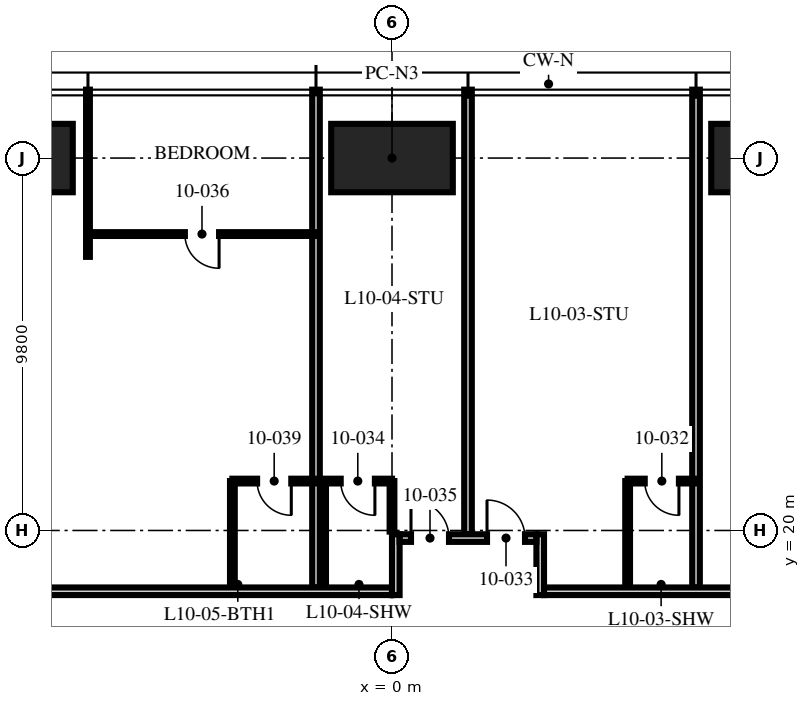
"""IFC4 building model, lengths in metres.
Left out: names, types, materials, properties, quantities, classifications, styles, units other than length and angle.
Written with IfcOpenShell. Run it as: python <this file> out.ifc"""

import sys

from ifc_helpers import new_model, si_unit, direction, frame, frame_2d, origin, origin_2d, place, context, subcontext, project, spatial, rectangle, hollow_rectangle, extrude, element, fill, save


model = new_model("IFC4")
c1 = context("Model", 3, precision=1e-05, world=origin(), true_north=direction((0.0, 1.0)))
c2 = subcontext(c1, "Body", "Model", "MODEL_VIEW")
j1 = project(units=[si_unit("LENGTHUNIT", "METRE"), si_unit("PLANEANGLEUNIT", "RADIAN")], contexts=[c1])
p1 = place(None, origin())
s1 = spatial("IfcSite", under=j1, at=p1, CompositionType="ELEMENT")
p2 = place(p1, origin())
s2 = spatial("IfcBuilding", under=s1, at=p2, CompositionType="ELEMENT")
p3 = place(p2, frame((0.0, 0.0, 43.5)))
s3 = spatial("IfcBuildingStorey", under=s2, at=p3, CompositionType="ELEMENT", Elevation=43.5)
for number, where, z_axis, x_axis in (
    (1, (-10.0, 29.8, 0.0), (0.0, 0.0, 1.0), (1.0, 0.0, 0.0)),
    (2, (0.0, 29.8, 0.0), (0.0, 0.0, 1.0), (1.0, 0.0, 0.0)),
    (3, (10.0, 29.8, 0.0), (0.0, 0.0, 1.0), (1.0, 0.0, 0.0)),
):
    element("IfcColumn", number, at=place(p3, frame(where, z_axis=z_axis, x_axis=x_axis)), inside=s3, PredefinedType="COLUMN", context=c2, shape_type="SweptSolid", body=[
        extrude(hollow_rectangle(XDim=3.2, YDim=1.8, WallThickness=0.2, at=origin_2d()), origin(), (0.0, 0.0, 1.0), 3.75),
    ])
p4 = place(p3, frame((8.0, 18.5, 0.0), z_axis=(0.0, 0.0, 1.0), x_axis=(0.0, 1.0, 0.0)))
e4 = element("IfcWall", 4, at=p4, inside=s3, PredefinedType="PARTITIONING", context=c2, shape_type="SweptSolid", body=[
    extrude(rectangle(XDim=13.1, YDim=0.2, at=frame_2d((6.55, 0.0))), origin(), (0.0, 0.0, 1.0), 2.71),
])
p5 = place(p3, frame((2.0, 19.9, 0.0), z_axis=(0.0, 0.0, 1.0), x_axis=(0.0, 1.0, 0.0)))
e5 = element("IfcWall", 5, at=p5, inside=s3, PredefinedType="PARTITIONING", context=c2, shape_type="SweptSolid", body=[
    extrude(rectangle(XDim=11.7, YDim=0.2, at=frame_2d((5.85, 0.0))), origin(), (0.0, 0.0, 1.0), 2.71),
])
p6 = place(p3, frame((-2.0, 18.5, 0.0), z_axis=(0.0, 0.0, 1.0), x_axis=(0.0, 1.0, 0.0)))
e6 = element("IfcWall", 6, at=p6, inside=s3, PredefinedType="PARTITIONING", context=c2, shape_type="SweptSolid", body=[
    extrude(rectangle(XDim=13.1, YDim=0.2, at=frame_2d((6.55, 0.0))), origin(), (0.0, 0.0, 1.0), 2.71),
])
p7 = place(p3, frame((-8.0, 27.2, 0.0), z_axis=(0.0, 0.0, 1.0), x_axis=(0.0, 1.0, 0.0)))
e7 = element("IfcWall", 7, at=p7, inside=s3, PredefinedType="PARTITIONING", context=c2, shape_type="SweptSolid", body=[
    extrude(rectangle(XDim=4.4, YDim=0.1, at=frame_2d((2.2, 0.0))), origin(), (0.0, 0.0, 1.0), 2.71),
])
p8 = place(p3, frame((8.0, 21.3, 0.0), z_axis=(0.0, 0.0, 1.0), x_axis=(-1.0, 0.0, 0.0)))
e8 = element("IfcWall", 8, at=p8, inside=s3, PredefinedType="PARTITIONING", context=c2, shape_type="SweptSolid", body=[
    extrude(rectangle(XDim=1.8, YDim=0.125, at=frame_2d((0.9, 0.0))), origin(), (0.0, 0.0, 1.0), 3.5),
])
p9 = place(p8, frame((0.45, 0.0, 0.0)))
e9 = element("IfcOpeningElement", 9, at=p9, cuts=e8, PredefinedType="OPENING", context=c2, shape_type="SweptSolid", body=[
    extrude(rectangle(XDim=0.9, YDim=2.1, at=frame_2d((0.45, 1.05))), frame((0.0, 0.073, 0.0), z_axis=(0.0, -1.0, 0.0), x_axis=(1.0, 0.0, 0.0)), (0.0, 0.0, 1.0), 0.145),
])
p10 = place(p3, frame((6.2, 18.5, 0.0), z_axis=(0.0, 0.0, 1.0), x_axis=(0.0, 1.0, 0.0)))
e10 = element("IfcWall", 10, at=p10, inside=s3, PredefinedType="PARTITIONING", context=c2, shape_type="SweptSolid", body=[
    extrude(rectangle(XDim=2.8, YDim=0.125, at=frame_2d((1.4, 0.0))), origin(), (0.0, 0.0, 1.0), 3.5),
])
p11 = place(p3, frame((0.0, 21.3, 0.0), z_axis=(0.0, 0.0, 1.0), x_axis=(-1.0, 0.0, 0.0)))
e11 = element("IfcWall", 11, at=p11, inside=s3, PredefinedType="PARTITIONING", context=c2, shape_type="SweptSolid", body=[
    extrude(rectangle(XDim=1.8, YDim=0.125, at=frame_2d((0.9, 0.0))), origin(), (0.0, 0.0, 1.0), 2.492),
])
p12 = place(p11, frame((0.45, 0.0, 0.0)))
e12 = element("IfcOpeningElement", 12, at=p12, cuts=e11, PredefinedType="OPENING", context=c2, shape_type="SweptSolid", body=[
    extrude(rectangle(XDim=0.9, YDim=2.1, at=frame_2d((0.45, 1.05))), frame((0.0, 0.073, 0.0), z_axis=(0.0, -1.0, 0.0), x_axis=(1.0, 0.0, 0.0)), (0.0, 0.0, 1.0), 0.145),
])
p13 = place(p3, frame((0.0, 19.97, 0.0), z_axis=(0.0, 0.0, 1.0), x_axis=(0.0, 1.0, 0.0)))
e13 = element("IfcWall", 13, at=p13, inside=s3, PredefinedType="PARTITIONING", context=c2, shape_type="SweptSolid", body=[
    extrude(rectangle(XDim=1.33, YDim=0.125, at=frame_2d((0.665, 0.0))), origin(), (0.0, 0.0, 1.0), 2.492),
])
p14 = place(p3, frame((-1.8, 18.5, 0.0), z_axis=(0.0, 0.0, 1.0), x_axis=(0.0, 1.0, 0.0)))
e14 = element("IfcWall", 14, at=p14, inside=s3, PredefinedType="PARTITIONING", context=c2, shape_type="SweptSolid", body=[
    extrude(rectangle(XDim=2.8, YDim=0.125, at=frame_2d((1.4, 0.0))), origin(), (0.0, 0.0, 1.0), 3.5),
])
p15 = place(p3, frame((-2.0, 27.8, 0.0), z_axis=(0.0, 0.0, 1.0), x_axis=(-1.0, 0.0, 0.0)))
e15 = element("IfcWall", 15, at=p15, inside=s3, PredefinedType="PARTITIONING", context=c2, shape_type="SweptSolid", body=[
    extrude(rectangle(XDim=6.0, YDim=0.1, at=frame_2d((3.0, 0.0))), origin(), (0.0, 0.0, 1.0), 2.61),
])
p16 = place(p15, frame((2.55, 0.0, 0.0)))
e16 = element("IfcOpeningElement", 16, at=p16, cuts=e15, PredefinedType="OPENING", context=c2, shape_type="SweptSolid", body=[
    extrude(rectangle(XDim=0.9, YDim=2.1, at=frame_2d((0.45, 1.05))), frame((0.0, 0.06, 0.0), z_axis=(0.0, -1.0, 0.0), x_axis=(1.0, 0.0, 0.0)), (0.0, 0.0, 1.0), 0.12),
])
p17 = place(p3, frame((-2.0, 21.3, 0.0), z_axis=(0.0, 0.0, 1.0), x_axis=(-1.0, 0.0, 0.0)))
e17 = element("IfcWall", 17, at=p17, inside=s3, PredefinedType="PARTITIONING", context=c2, shape_type="SweptSolid", body=[
    extrude(rectangle(XDim=2.2, YDim=0.125, at=frame_2d((1.1, 0.0))), origin(), (0.0, 0.0, 1.0), 3.5),
])
p18 = place(p17, frame((0.65, 0.0, 0.0)))
e18 = element("IfcOpeningElement", 18, at=p18, cuts=e17, PredefinedType="OPENING", context=c2, shape_type="SweptSolid", body=[
    extrude(rectangle(XDim=0.9, YDim=2.1, at=frame_2d((0.45, 1.05))), frame((0.0, 0.073, 0.0), z_axis=(0.0, -1.0, 0.0), x_axis=(1.0, 0.0, 0.0)), (0.0, 0.0, 1.0), 0.145),
])
p19 = place(p3, frame((-4.2, 18.5, 0.0), z_axis=(0.0, 0.0, 1.0), x_axis=(0.0, 1.0, 0.0)))
e19 = element("IfcWall", 19, at=p19, inside=s3, PredefinedType="PARTITIONING", context=c2, shape_type="SweptSolid", body=[
    extrude(rectangle(XDim=2.8, YDim=0.125, at=frame_2d((1.4, 0.0))), origin(), (0.0, 0.0, 1.0), 3.5),
])
p20 = place(p3, frame((-18.5, 18.4, 0.0), z_axis=(0.0, 0.0, 1.0), x_axis=(1.0, 0.0, 0.0)))
e20 = element("IfcWall", 20, at=p20, inside=s3, PredefinedType="PARTITIONING", context=c2, shape_type="SweptSolid", body=[
    extrude(rectangle(XDim=18.5, YDim=0.2, at=frame_2d((9.25, 0.0))), origin(), (0.0, 0.0, 1.0), 2.3),
])
p21 = place(p20, frame((0.98, 0.0, 0.0)))
e21 = element("IfcOpeningElement", 21, at=p21, cuts=e20, PredefinedType="OPENING", context=c2, shape_type="SweptSolid", body=[
    extrude(rectangle(XDim=1.0, YDim=2.2, at=frame_2d((0.5, 1.1))), frame((0.0, 0.11, 0.0), z_axis=(0.0, -1.0, 0.0), x_axis=(1.0, 0.0, 0.0)), (0.0, 0.0, 1.0), 0.22),
])
p22 = place(p3, frame((0.1, 18.3, 0.0), z_axis=(0.0, 0.0, 1.0), x_axis=(0.0, 1.0, 0.0)))
e22 = element("IfcWall", 22, at=p22, inside=s3, PredefinedType="PARTITIONING", context=c2, shape_type="SweptSolid", body=[
    extrude(rectangle(XDim=1.6, YDim=0.2, at=frame_2d((0.8, 0.0))), origin(), (0.0, 0.0, 1.0), 2.492),
])
p23 = place(p3, frame((3.9, 18.3, 0.0), z_axis=(0.0, 0.0, 1.0), x_axis=(0.0, 1.0, 0.0)))
e23 = element("IfcWall", 23, at=p23, inside=s3, PredefinedType="PARTITIONING", context=c2, shape_type="SweptSolid", body=[
    extrude(rectangle(XDim=1.6, YDim=0.2, at=frame_2d((0.8, 0.0))), origin(), (0.0, 0.0, 1.0), 3.5),
])
p24 = place(p3, frame((0.2, 19.8, 0.0), z_axis=(0.0, 0.0, 1.0), x_axis=(1.0, 0.0, 0.0)))
e24 = element("IfcWall", 24, at=p24, inside=s3, PredefinedType="PARTITIONING", context=c2, shape_type="SweptSolid", body=[
    extrude(rectangle(XDim=3.6, YDim=0.2, at=frame_2d((1.8, 0.0))), origin(), (0.0, 0.0, 1.0), 3.5),
])
p25 = place(p24, frame((2.3, 0.0, 0.0)))
e25 = element("IfcOpeningElement", 25, at=p25, cuts=e24, PredefinedType="OPENING", context=c2, shape_type="SweptSolid", body=[
    extrude(rectangle(XDim=1.0, YDim=2.2, at=frame_2d((0.5, 1.1))), frame((0.0, 0.11, 0.0), z_axis=(0.0, -1.0, 0.0), x_axis=(1.0, 0.0, 0.0)), (0.0, 0.0, 1.0), 0.22),
])
p26 = place(p24, frame((0.3, 0.0, 0.0)))
e26 = element("IfcOpeningElement", 26, at=p26, cuts=e24, PredefinedType="OPENING", context=c2, shape_type="SweptSolid", body=[
    extrude(rectangle(XDim=1.0, YDim=2.2, at=frame_2d((0.5, 1.1))), frame((0.0, 0.11, 0.0), z_axis=(0.0, -1.0, 0.0), x_axis=(1.0, 0.0, 0.0)), (0.0, 0.0, 1.0), 0.22),
])
p27 = place(p3, frame((4.0, 18.4, 0.0), z_axis=(0.0, 0.0, 1.0), x_axis=(1.0, 0.0, 0.0)))
e27 = element("IfcWall", 27, at=p27, inside=s3, PredefinedType="PARTITIONING", context=c2, shape_type="SweptSolid", body=[
    extrude(rectangle(XDim=14.5, YDim=0.2, at=frame_2d((7.25, 0.0))), origin(), (0.0, 0.0, 1.0), 2.3),
])
p28 = place(p9, origin())
e28 = element("IfcDoor", 28, at=p28, inside=s3, OperationType="SINGLE_SWING_LEFT", PredefinedType="DOOR", context=c2, shape_type="SweptSolid", body=[
    extrude(rectangle(XDim=0.9, YDim=2.1, at=frame_2d((0.45, 1.05))), frame((0.0, 0.025, 0.0), z_axis=(0.0, -1.0, 0.0), x_axis=(1.0, 0.0, 0.0)), (0.0, 0.0, 1.0), 0.05),
])
fill(e9, e28)
p29 = place(p25, origin())
e29 = element("IfcDoor", 29, at=p29, inside=s3, OperationType="SINGLE_SWING_LEFT", PredefinedType="DOOR", context=c2, shape_type="SweptSolid", body=[
    extrude(rectangle(XDim=1.0, YDim=2.2, at=frame_2d((0.5, 1.1))), frame((0.0, 0.025, 0.0), z_axis=(0.0, -1.0, 0.0), x_axis=(1.0, 0.0, 0.0)), (0.0, 0.0, 1.0), 0.05),
])
fill(e25, e29)
p30 = place(p12, origin())
e30 = element("IfcDoor", 30, at=p30, inside=s3, OperationType="SINGLE_SWING_LEFT", PredefinedType="DOOR", context=c2, shape_type="SweptSolid", body=[
    extrude(rectangle(XDim=0.9, YDim=2.1, at=frame_2d((0.45, 1.05))), frame((0.0, 0.025, 0.0), z_axis=(0.0, -1.0, 0.0), x_axis=(1.0, 0.0, 0.0)), (0.0, 0.0, 1.0), 0.05),
])
fill(e12, e30)
p31 = place(p26, origin())
e31 = element("IfcDoor", 31, at=p31, inside=s3, OperationType="SINGLE_SWING_LEFT", PredefinedType="DOOR", context=c2, shape_type="SweptSolid", body=[
    extrude(rectangle(XDim=1.0, YDim=2.2, at=frame_2d((0.5, 1.1))), frame((0.0, 0.025, 0.0), z_axis=(0.0, -1.0, 0.0), x_axis=(1.0, 0.0, 0.0)), (0.0, 0.0, 1.0), 0.05),
])
fill(e26, e31)
p32 = place(p16, origin())
e32 = element("IfcDoor", 32, at=p32, inside=s3, OperationType="SINGLE_SWING_LEFT", PredefinedType="DOOR", context=c2, shape_type="SweptSolid", body=[
    extrude(rectangle(XDim=0.9, YDim=2.1, at=frame_2d((0.45, 1.05))), frame((0.0, 0.025, 0.0), z_axis=(0.0, -1.0, 0.0), x_axis=(1.0, 0.0, 0.0)), (0.0, 0.0, 1.0), 0.05),
])
fill(e16, e32)
p33 = place(p18, origin())
e33 = element("IfcDoor", 33, at=p33, inside=s3, OperationType="SINGLE_SWING_LEFT", PredefinedType="DOOR", context=c2, shape_type="SweptSolid", body=[
    extrude(rectangle(XDim=0.9, YDim=2.1, at=frame_2d((0.45, 1.05))), frame((0.0, 0.025, 0.0), z_axis=(0.0, -1.0, 0.0), x_axis=(1.0, 0.0, 0.0)), (0.0, 0.0, 1.0), 0.05),
])
fill(e18, e33)
save(model, sys.argv[1])
